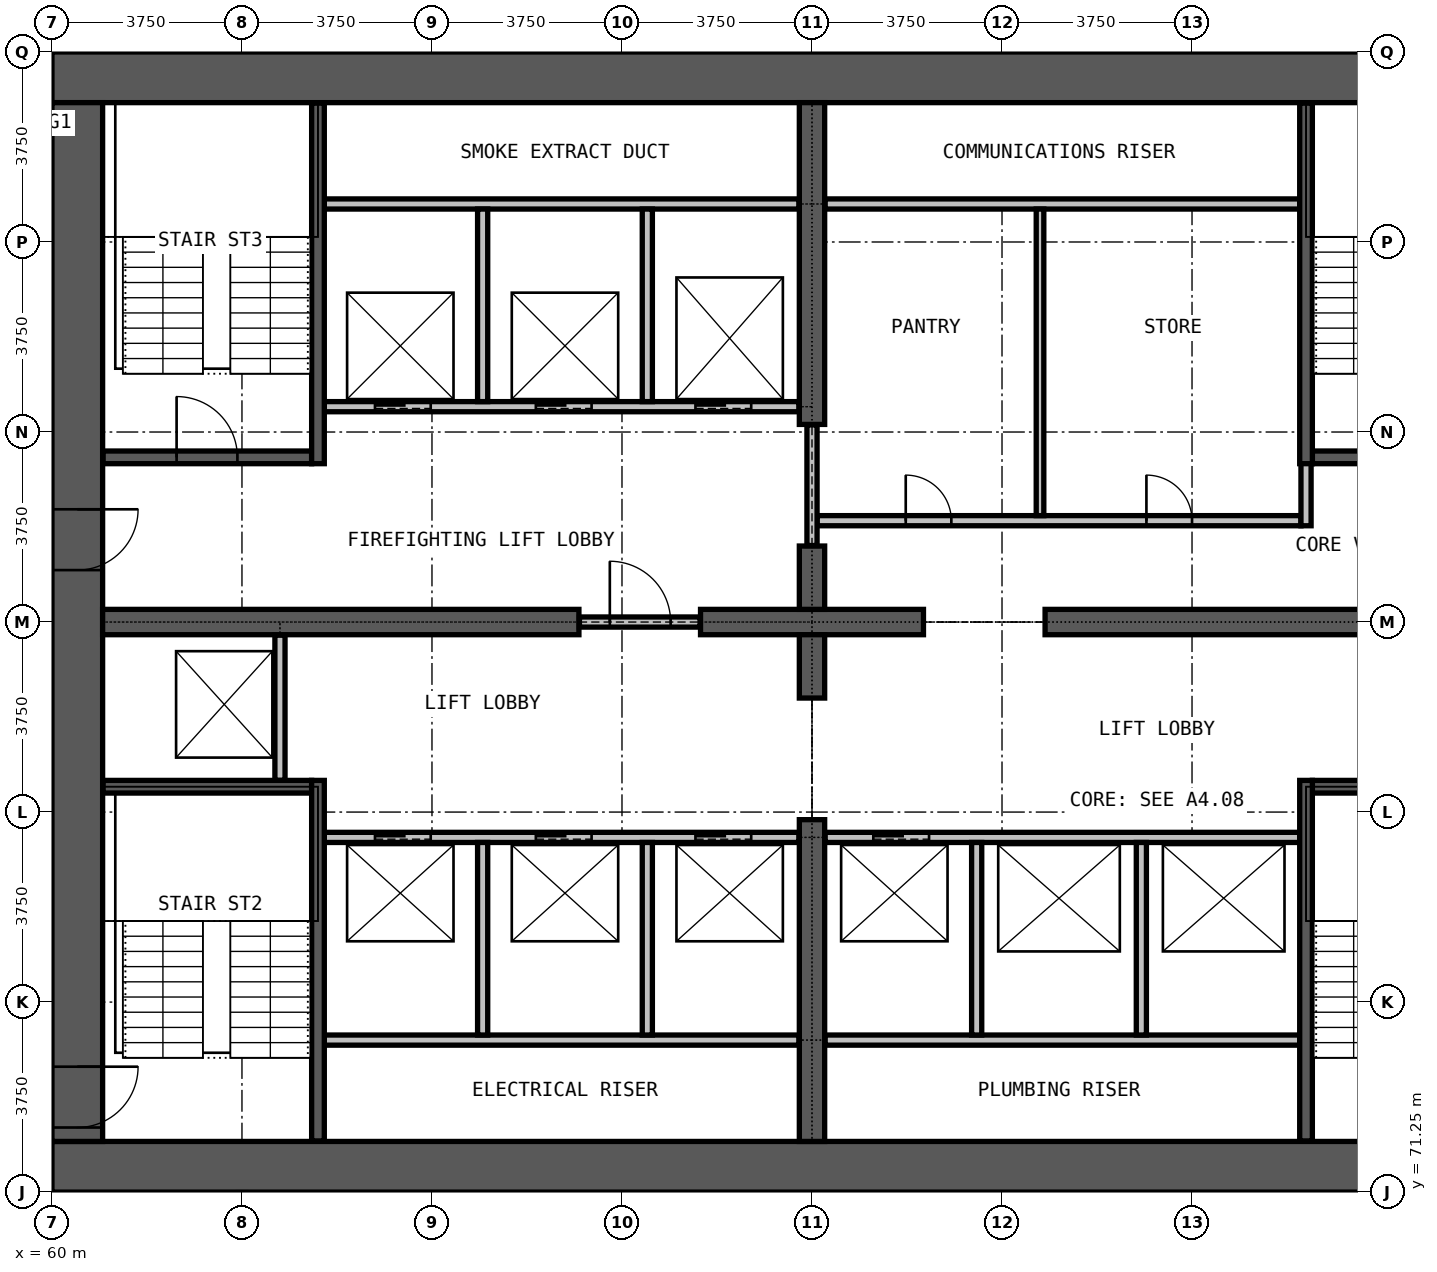
"""IFC4 building model, lengths in metres.
Left out: names, types, materials, properties, quantities, classifications, styles, units other than length and angle.
Written with IfcOpenShell. Run it as: python <this file> out.ifc"""

import sys

from ifc_helpers import new_model, si_unit, direction, frame, frame_2d, origin, place, context, subcontext, project, spatial, rectangle, extrude, element, fill, save


model = new_model("IFC4")
c1 = context("Model", 3, precision=1e-05, world=origin(), true_north=direction((0.0, 1.0)))
c2 = subcontext(c1, "Body", "Model", "MODEL_VIEW")
j1 = project(units=[si_unit("LENGTHUNIT", "METRE"), si_unit("PLANEANGLEUNIT", "RADIAN")], contexts=[c1])
p1 = place(None, origin())
s1 = spatial("IfcSite", under=j1, at=p1, CompositionType="ELEMENT")
p2 = place(p1, origin())
s2 = spatial("IfcBuilding", under=s1, at=p2, CompositionType="ELEMENT")
p3 = place(p2, frame((0.0, 0.0, 65.9)))
s3 = spatial("IfcBuildingStorey", under=s2, at=p3, CompositionType="ELEMENT", Elevation=65.9)
for number, where, z_axis, x_axis in (
    (1, (60.0, 71.75, 0.0), (0.0, 0.0, 1.0), (1.0, 0.0, 0.0)),
    (2, (90.0, 93.25, 0.0), (0.0, 0.0, 1.0), (-1.0, 0.0, 0.0)),
):
    element("IfcWall", number, at=place(p3, frame(where, z_axis=z_axis, x_axis=x_axis)), inside=s3, PredefinedType="SHEAR", context=c2, shape_type="SweptSolid", body=[
        extrude(rectangle(XDim=30.0, YDim=1.0, at=frame_2d((15.0, 0.0))), origin(), (0.0, 0.0, 1.0), 3.3),
    ])
p4 = place(p3, frame((60.5, 92.75, 0.0), z_axis=(0.0, 0.0, 1.0), x_axis=(0.0, -1.0, 0.0)))
e3 = element("IfcWall", 3, at=p4, inside=s3, PredefinedType="SHEAR", context=c2, shape_type="SweptSolid", body=[
    extrude(rectangle(XDim=20.5, YDim=1.0, at=frame_2d((10.25, 0.0))), origin(), (0.0, 0.0, 1.0), 3.3),
])
p5 = place(p4, frame((19.025, 0.0, 0.0)))
e4 = element("IfcOpeningElement", 4, at=p5, cuts=e3, PredefinedType="OPENING", context=c2, shape_type="SweptSolid", body=[
    extrude(rectangle(XDim=1.2, YDim=2.2, at=frame_2d((0.6, 1.1))), frame((0.0, 0.51, 0.0), z_axis=(0.0, -1.0, 0.0), x_axis=(1.0, 0.0, 0.0)), (0.0, 0.0, 1.0), 1.02),
])
p6 = place(p4, frame((8.025, 0.0, 0.0)))
e5 = element("IfcOpeningElement", 5, at=p6, cuts=e3, PredefinedType="OPENING", context=c2, shape_type="SweptSolid", body=[
    extrude(rectangle(XDim=1.2, YDim=2.2, at=frame_2d((0.6, 1.1))), frame((0.0, 0.51, 0.0), z_axis=(0.0, -1.0, 0.0), x_axis=(1.0, 0.0, 0.0)), (0.0, 0.0, 1.0), 1.02),
])
p7 = place(p3, frame((61.0, 82.5, 0.0), z_axis=(0.0, 0.0, 1.0), x_axis=(1.0, 0.0, 0.0)))
e6 = element("IfcWall", 6, at=p7, inside=s3, PredefinedType="SHEAR", context=c2, shape_type="SweptSolid", body=[
    extrude(rectangle(XDim=9.4, YDim=0.5, at=frame_2d((4.7, 0.0))), origin(), (0.0, 0.0, 1.0), 3.3),
])
p8 = place(p3, frame((72.8, 82.5, 0.0), z_axis=(0.0, 0.0, 1.0), x_axis=(1.0, 0.0, 0.0)))
e7 = element("IfcWall", 7, at=p8, inside=s3, PredefinedType="SHEAR", context=c2, shape_type="SweptSolid", body=[
    extrude(rectangle(XDim=4.4, YDim=0.5, at=frame_2d((2.2, 0.0))), origin(), (0.0, 0.0, 1.0), 3.3),
])
p9 = place(p3, frame((79.6, 82.5, 0.0), z_axis=(0.0, 0.0, 1.0), x_axis=(1.0, 0.0, 0.0)))
e8 = element("IfcWall", 8, at=p9, inside=s3, PredefinedType="SHEAR", context=c2, shape_type="SweptSolid", body=[
    extrude(rectangle(XDim=9.4, YDim=0.5, at=frame_2d((4.7, 0.0))), origin(), (0.0, 0.0, 1.0), 3.3),
])
p10 = place(p3, frame((75.0, 72.25, 0.0), z_axis=(0.0, 0.0, 1.0), x_axis=(0.0, 1.0, 0.0)))
e9 = element("IfcWall", 9, at=p10, inside=s3, PredefinedType="SHEAR", context=c2, shape_type="SweptSolid", body=[
    extrude(rectangle(XDim=6.35, YDim=0.5, at=frame_2d((3.175, 0.0))), origin(), (0.0, 0.0, 1.0), 3.3),
])
for number, where, z_axis, x_axis in (
    (10, (75.0, 81.0, 0.0), (0.0, 0.0, 1.0), (0.0, 1.0, 0.0)),
    (11, (75.0, 82.75, 0.0), (0.0, 0.0, 1.0), (0.0, 1.0, 0.0)),
):
    element("IfcWall", number, at=place(p3, frame(where, z_axis=z_axis, x_axis=x_axis)), inside=s3, PredefinedType="SHEAR", context=c2, shape_type="SweptSolid", body=[
        extrude(rectangle(XDim=1.25, YDim=0.5, at=frame_2d((0.625, 0.0))), origin(), (0.0, 0.0, 1.0), 3.3),
    ])
p11 = place(p3, frame((75.0, 86.4, 0.0), z_axis=(0.0, 0.0, 1.0), x_axis=(0.0, 1.0, 0.0)))
e12 = element("IfcWall", 12, at=p11, inside=s3, PredefinedType="SHEAR", context=c2, shape_type="SweptSolid", body=[
    extrude(rectangle(XDim=6.35, YDim=0.5, at=frame_2d((3.175, 0.0))), origin(), (0.0, 0.0, 1.0), 3.3),
])
p12 = place(p3, frame((70.41, 82.5, 0.0), z_axis=(0.0, 0.0, 1.0), x_axis=(1.0, 0.0, 0.0)))
e13 = element("IfcWall", 13, at=p12, inside=s3, PredefinedType="PARTITIONING", context=c2, shape_type="SweptSolid", body=[
    extrude(rectangle(XDim=2.38, YDim=0.2, at=frame_2d((1.19, 0.0))), origin(), (0.0, 0.0, 1.0), 2.4),
])
p13 = place(p12, frame((0.6, 0.0, 0.0)))
e14 = element("IfcOpeningElement", 14, at=p13, cuts=e13, PredefinedType="OPENING", context=c2, shape_type="SweptSolid", body=[
    extrude(rectangle(XDim=1.2, YDim=2.2, at=frame_2d((0.6, 1.1))), frame((0.0, 0.11, 0.0), z_axis=(0.0, -1.0, 0.0), x_axis=(1.0, 0.0, 0.0)), (0.0, 0.0, 1.0), 0.22),
])
p14 = place(p3, frame((75.1, 84.5, 0.0), z_axis=(0.0, 0.0, 1.0), x_axis=(1.0, 0.0, 0.0)))
e15 = element("IfcWall", 15, at=p14, inside=s3, PredefinedType="PARTITIONING", context=c2, shape_type="SweptSolid", body=[
    extrude(rectangle(XDim=9.55, YDim=0.2, at=frame_2d((4.775, 0.0))), origin(), (0.0, 0.0, 1.0), 3.0),
])
p15 = place(p14, frame((1.75, 0.0, 0.0)))
e16 = element("IfcOpeningElement", 16, at=p15, cuts=e15, PredefinedType="OPENING", context=c2, shape_type="SweptSolid", body=[
    extrude(rectangle(XDim=0.9, YDim=2.2, at=frame_2d((0.45, 1.1))), frame((0.0, 0.11, 0.0), z_axis=(0.0, -1.0, 0.0), x_axis=(1.0, 0.0, 0.0)), (0.0, 0.0, 1.0), 0.22),
])
p16 = place(p14, frame((6.5, 0.0, 0.0)))
e17 = element("IfcOpeningElement", 17, at=p16, cuts=e15, PredefinedType="OPENING", context=c2, shape_type="SweptSolid", body=[
    extrude(rectangle(XDim=0.9, YDim=2.2, at=frame_2d((0.45, 1.1))), frame((0.0, 0.11, 0.0), z_axis=(0.0, -1.0, 0.0), x_axis=(1.0, 0.0, 0.0)), (0.0, 0.0, 1.0), 0.22),
])
p17 = place(p3, frame((75.26, 90.75, 0.0), z_axis=(0.0, 0.0, 1.0), x_axis=(1.0, 0.0, 0.0)))
e18 = element("IfcWall", 18, at=p17, inside=s3, PredefinedType="PARTITIONING", context=c2, shape_type="SweptSolid", body=[
    extrude(rectangle(XDim=9.365, YDim=0.2, at=frame_2d((4.683, 0.0))), origin(), (0.0, 0.0, 1.0), 3.0),
])
p18 = place(p3, frame((75.0, 84.01, 0.0), z_axis=(0.0, 0.0, 1.0), x_axis=(0.0, 1.0, 0.0)))
e19 = element("IfcWall", 19, at=p18, inside=s3, PredefinedType="PARTITIONING", context=c2, shape_type="SweptSolid", body=[
    extrude(rectangle(XDim=2.38, YDim=0.2, at=frame_2d((1.19, 0.0))), origin(), (0.0, 0.0, 1.0), 2.4),
])
p19 = place(p3, frame((84.75, 84.4, 0.0), z_axis=(0.0, 0.0, 1.0), x_axis=(0.0, 1.0, 0.0)))
e20 = element("IfcWall", 20, at=p19, inside=s3, PredefinedType="PARTITIONING", context=c2, shape_type="SweptSolid", body=[
    extrude(rectangle(XDim=1.475, YDim=0.2, at=frame_2d((0.738, 0.0))), origin(), (0.0, 0.0, 1.0), 3.0),
])
p20 = place(p3, frame((79.5, 84.6, 0.0), z_axis=(0.0, 0.0, 1.0), x_axis=(0.0, 1.0, 0.0)))
e21 = element("IfcWall", 21, at=p20, inside=s3, PredefinedType="PARTITIONING", context=c2, shape_type="SweptSolid", body=[
    extrude(rectangle(XDim=6.05, YDim=0.15, at=frame_2d((3.025, 0.0))), origin(), (0.0, 0.0, 1.0), 3.0),
])
for number, where, z_axis, x_axis in (
    (22, (65.375, 74.25, 0.0), (0.0, 0.0, 1.0), (1.0, 0.0, 0.0)),
    (23, (75.26, 74.25, 0.0), (0.0, 0.0, 1.0), (1.0, 0.0, 0.0)),
):
    element("IfcWall", number, at=place(p3, frame(where, z_axis=z_axis, x_axis=x_axis)), inside=s3, PredefinedType="PARTITIONING", context=c2, shape_type="SweptSolid", body=[
        extrude(rectangle(XDim=9.365, YDim=0.2, at=frame_2d((4.683, 0.0))), origin(), (0.0, 0.0, 1.0), 3.0),
    ])
p21 = place(p3, frame((65.375, 78.25, 0.0), z_axis=(0.0, 0.0, 1.0), x_axis=(1.0, 0.0, 0.0)))
e24 = element("IfcWall", 24, at=p21, inside=s3, PredefinedType="PARTITIONING", context=c2, shape_type="SweptSolid", body=[
    extrude(rectangle(XDim=9.365, YDim=0.2, at=frame_2d((4.683, 0.0))), origin(), (0.0, 0.0, 1.0), 3.0),
])
p22 = place(p21, frame((1.0, 0.0, 0.0)))
e25 = element("IfcOpeningElement", 25, at=p22, cuts=e24, PredefinedType="OPENING", context=c2, shape_type="SweptSolid", body=[
    extrude(rectangle(XDim=1.1, YDim=2.2, at=frame_2d((0.55, 1.1))), frame((0.0, 0.11, 0.0), z_axis=(0.0, -1.0, 0.0), x_axis=(1.0, 0.0, 0.0)), (0.0, 0.0, 1.0), 0.22),
])
p23 = place(p21, frame((4.175, 0.0, 0.0)))
e26 = element("IfcOpeningElement", 26, at=p23, cuts=e24, PredefinedType="OPENING", context=c2, shape_type="SweptSolid", body=[
    extrude(rectangle(XDim=1.1, YDim=2.2, at=frame_2d((0.55, 1.1))), frame((0.0, 0.11, 0.0), z_axis=(0.0, -1.0, 0.0), x_axis=(1.0, 0.0, 0.0)), (0.0, 0.0, 1.0), 0.22),
])
p24 = place(p21, frame((7.325, 0.0, 0.0)))
e27 = element("IfcOpeningElement", 27, at=p24, cuts=e24, PredefinedType="OPENING", context=c2, shape_type="SweptSolid", body=[
    extrude(rectangle(XDim=1.1, YDim=2.2, at=frame_2d((0.55, 1.1))), frame((0.0, 0.11, 0.0), z_axis=(0.0, -1.0, 0.0), x_axis=(1.0, 0.0, 0.0)), (0.0, 0.0, 1.0), 0.22),
])
p25 = place(p3, frame((75.26, 78.25, 0.0), z_axis=(0.0, 0.0, 1.0), x_axis=(1.0, 0.0, 0.0)))
e28 = element("IfcWall", 28, at=p25, inside=s3, PredefinedType="PARTITIONING", context=c2, shape_type="SweptSolid", body=[
    extrude(rectangle(XDim=9.365, YDim=0.2, at=frame_2d((4.683, 0.0))), origin(), (0.0, 0.0, 1.0), 3.0),
])
p26 = place(p25, frame((0.95, 0.0, 0.0)))
e29 = element("IfcOpeningElement", 29, at=p26, cuts=e28, PredefinedType="OPENING", context=c2, shape_type="SweptSolid", body=[
    extrude(rectangle(XDim=1.1, YDim=2.2, at=frame_2d((0.55, 1.1))), frame((0.0, 0.11, 0.0), z_axis=(0.0, -1.0, 0.0), x_axis=(1.0, 0.0, 0.0)), (0.0, 0.0, 1.0), 0.22),
])
p27 = place(p3, frame((65.375, 86.75, 0.0), z_axis=(0.0, 0.0, 1.0), x_axis=(1.0, 0.0, 0.0)))
e30 = element("IfcWall", 30, at=p27, inside=s3, PredefinedType="PARTITIONING", context=c2, shape_type="SweptSolid", body=[
    extrude(rectangle(XDim=9.365, YDim=0.2, at=frame_2d((4.683, 0.0))), origin(), (0.0, 0.0, 1.0), 3.0),
])
p28 = place(p27, frame((1.0, 0.0, 0.0)))
e31 = element("IfcOpeningElement", 31, at=p28, cuts=e30, PredefinedType="OPENING", context=c2, shape_type="SweptSolid", body=[
    extrude(rectangle(XDim=1.1, YDim=2.2, at=frame_2d((0.55, 1.1))), frame((0.0, 0.11, 0.0), z_axis=(0.0, -1.0, 0.0), x_axis=(1.0, 0.0, 0.0)), (0.0, 0.0, 1.0), 0.22),
])
p29 = place(p27, frame((4.175, 0.0, 0.0)))
e32 = element("IfcOpeningElement", 32, at=p29, cuts=e30, PredefinedType="OPENING", context=c2, shape_type="SweptSolid", body=[
    extrude(rectangle(XDim=1.1, YDim=2.2, at=frame_2d((0.55, 1.1))), frame((0.0, 0.11, 0.0), z_axis=(0.0, -1.0, 0.0), x_axis=(1.0, 0.0, 0.0)), (0.0, 0.0, 1.0), 0.22),
])
p30 = place(p27, frame((7.325, 0.0, 0.0)))
e33 = element("IfcOpeningElement", 33, at=p30, cuts=e30, PredefinedType="OPENING", context=c2, shape_type="SweptSolid", body=[
    extrude(rectangle(XDim=1.1, YDim=2.2, at=frame_2d((0.55, 1.1))), frame((0.0, 0.11, 0.0), z_axis=(0.0, -1.0, 0.0), x_axis=(1.0, 0.0, 0.0)), (0.0, 0.0, 1.0), 0.22),
])
p31 = place(p3, frame((65.375, 90.75, 0.0), z_axis=(0.0, 0.0, 1.0), x_axis=(1.0, 0.0, 0.0)))
e34 = element("IfcWall", 34, at=p31, inside=s3, PredefinedType="PARTITIONING", context=c2, shape_type="SweptSolid", body=[
    extrude(rectangle(XDim=9.365, YDim=0.2, at=frame_2d((4.683, 0.0))), origin(), (0.0, 0.0, 1.0), 3.0),
])
p32 = place(p3, frame((64.5, 79.375, 0.0), z_axis=(0.0, 0.0, 1.0), x_axis=(0.0, 1.0, 0.0)))
e35 = element("IfcWall", 35, at=p32, inside=s3, PredefinedType="PARTITIONING", context=c2, shape_type="SweptSolid", body=[
    extrude(rectangle(XDim=2.865, YDim=0.2, at=frame_2d((1.433, 0.0))), origin(), (0.0, 0.0, 1.0), 3.0),
])
for number, where, z_axis, x_axis in (
    (36, (68.5, 74.35, 0.0), (0.0, 0.0, 1.0), (0.0, 1.0, 0.0)),
    (37, (68.5, 86.85, 0.0), (0.0, 0.0, 1.0), (0.0, 1.0, 0.0)),
    (38, (71.75, 74.35, 0.0), (0.0, 0.0, 1.0), (0.0, 1.0, 0.0)),
    (39, (71.75, 86.85, 0.0), (0.0, 0.0, 1.0), (0.0, 1.0, 0.0)),
    (40, (78.25, 74.35, 0.0), (0.0, 0.0, 1.0), (0.0, 1.0, 0.0)),
    (41, (81.5, 74.35, 0.0), (0.0, 0.0, 1.0), (0.0, 1.0, 0.0)),
):
    element("IfcWall", number, at=place(p3, frame(where, z_axis=z_axis, x_axis=x_axis)), inside=s3, PredefinedType="PARTITIONING", context=c2, shape_type="SweptSolid", body=[
        extrude(rectangle(XDim=3.8, YDim=0.2, at=frame_2d((1.9, 0.0))), origin(), (0.0, 0.0, 1.0), 3.0),
    ])
for number, where, z_axis, x_axis in (
    (42, (61.01, 79.25, 0.0), (0.0, 0.0, 1.0), (1.0, 0.0, 0.0)),
    (43, (84.875, 79.25, 0.0), (0.0, 0.0, 1.0), (1.0, 0.0, 0.0)),
):
    element("IfcWall", number, at=place(p3, frame(where, z_axis=z_axis, x_axis=x_axis)), inside=s3, PredefinedType="PARTITIONING", context=c2, shape_type="SweptSolid", body=[
        extrude(rectangle(XDim=4.115, YDim=0.25, at=frame_2d((2.058, 0.0))), origin(), (0.0, 0.0, 1.0), 3.0),
    ])
p33 = place(p3, frame((61.01, 85.75, 0.0), z_axis=(0.0, 0.0, 1.0), x_axis=(1.0, 0.0, 0.0)))
e44 = element("IfcWall", 44, at=p33, inside=s3, PredefinedType="PARTITIONING", context=c2, shape_type="SweptSolid", body=[
    extrude(rectangle(XDim=4.115, YDim=0.25, at=frame_2d((2.058, 0.0))), origin(), (0.0, 0.0, 1.0), 3.0),
])
p34 = place(p33, frame((1.45, 0.0, 0.0)))
e45 = element("IfcOpeningElement", 45, at=p34, cuts=e44, PredefinedType="OPENING", context=c2, shape_type="SweptSolid", body=[
    extrude(rectangle(XDim=1.2, YDim=2.2, at=frame_2d((0.6, 1.1))), frame((0.0, 0.135, 0.0), z_axis=(0.0, -1.0, 0.0), x_axis=(1.0, 0.0, 0.0)), (0.0, 0.0, 1.0), 0.27),
])
p35 = place(p3, frame((84.875, 85.75, 0.0), z_axis=(0.0, 0.0, 1.0), x_axis=(1.0, 0.0, 0.0)))
e46 = element("IfcWall", 46, at=p35, inside=s3, PredefinedType="PARTITIONING", context=c2, shape_type="SweptSolid", body=[
    extrude(rectangle(XDim=4.115, YDim=0.25, at=frame_2d((2.058, 0.0))), origin(), (0.0, 0.0, 1.0), 3.0),
])
for number, where, z_axis, x_axis in (
    (47, (65.25, 72.26, 0.0), (0.0, 0.0, 1.0), (0.0, 1.0, 0.0)),
    (48, (65.25, 85.625, 0.0), (0.0, 0.0, 1.0), (0.0, 1.0, 0.0)),
    (49, (84.75, 72.26, 0.0), (0.0, 0.0, 1.0), (0.0, 1.0, 0.0)),
    (50, (84.75, 85.625, 0.0), (0.0, 0.0, 1.0), (0.0, 1.0, 0.0)),
):
    element("IfcWall", number, at=place(p3, frame(where, z_axis=z_axis, x_axis=x_axis)), inside=s3, PredefinedType="PARTITIONING", context=c2, shape_type="SweptSolid", body=[
        extrude(rectangle(XDim=7.115, YDim=0.25, at=frame_2d((3.558, 0.0))), origin(), (0.0, 0.0, 1.0), 3.0),
    ])
p36 = place(p22, origin())
e51 = element("IfcDoor", 51, at=p36, inside=s3, OperationType="DOUBLE_DOOR_SLIDING", PredefinedType="DOOR", context=c2, shape_type="SweptSolid", body=[
    extrude(rectangle(XDim=1.1, YDim=2.2, at=frame_2d((0.55, 1.1))), frame((0.0, 0.025, 0.0), z_axis=(0.0, -1.0, 0.0), x_axis=(1.0, 0.0, 0.0)), (0.0, 0.0, 1.0), 0.05),
])
fill(e25, e51)
p37 = place(p23, origin())
e52 = element("IfcDoor", 52, at=p37, inside=s3, OperationType="DOUBLE_DOOR_SLIDING", PredefinedType="DOOR", context=c2, shape_type="SweptSolid", body=[
    extrude(rectangle(XDim=1.1, YDim=2.2, at=frame_2d((0.55, 1.1))), frame((0.0, 0.025, 0.0), z_axis=(0.0, -1.0, 0.0), x_axis=(1.0, 0.0, 0.0)), (0.0, 0.0, 1.0), 0.05),
])
fill(e26, e52)
p38 = place(p24, origin())
e53 = element("IfcDoor", 53, at=p38, inside=s3, OperationType="DOUBLE_DOOR_SLIDING", PredefinedType="DOOR", context=c2, shape_type="SweptSolid", body=[
    extrude(rectangle(XDim=1.1, YDim=2.2, at=frame_2d((0.55, 1.1))), frame((0.0, 0.025, 0.0), z_axis=(0.0, -1.0, 0.0), x_axis=(1.0, 0.0, 0.0)), (0.0, 0.0, 1.0), 0.05),
])
fill(e27, e53)
p39 = place(p26, origin())
e54 = element("IfcDoor", 54, at=p39, inside=s3, OperationType="DOUBLE_DOOR_SLIDING", PredefinedType="DOOR", context=c2, shape_type="SweptSolid", body=[
    extrude(rectangle(XDim=1.1, YDim=2.2, at=frame_2d((0.55, 1.1))), frame((0.0, 0.025, 0.0), z_axis=(0.0, -1.0, 0.0), x_axis=(1.0, 0.0, 0.0)), (0.0, 0.0, 1.0), 0.05),
])
fill(e29, e54)
p40 = place(p28, origin())
e55 = element("IfcDoor", 55, at=p40, inside=s3, OperationType="DOUBLE_DOOR_SLIDING", PredefinedType="DOOR", context=c2, shape_type="SweptSolid", body=[
    extrude(rectangle(XDim=1.1, YDim=2.2, at=frame_2d((0.55, 1.1))), frame((0.0, 0.025, 0.0), z_axis=(0.0, -1.0, 0.0), x_axis=(1.0, 0.0, 0.0)), (0.0, 0.0, 1.0), 0.05),
])
fill(e31, e55)
p41 = place(p29, origin())
e56 = element("IfcDoor", 56, at=p41, inside=s3, OperationType="DOUBLE_DOOR_SLIDING", PredefinedType="DOOR", context=c2, shape_type="SweptSolid", body=[
    extrude(rectangle(XDim=1.1, YDim=2.2, at=frame_2d((0.55, 1.1))), frame((0.0, 0.025, 0.0), z_axis=(0.0, -1.0, 0.0), x_axis=(1.0, 0.0, 0.0)), (0.0, 0.0, 1.0), 0.05),
])
fill(e32, e56)
p42 = place(p30, origin())
e57 = element("IfcDoor", 57, at=p42, inside=s3, OperationType="DOUBLE_DOOR_SLIDING", PredefinedType="DOOR", context=c2, shape_type="SweptSolid", body=[
    extrude(rectangle(XDim=1.1, YDim=2.2, at=frame_2d((0.55, 1.1))), frame((0.0, 0.025, 0.0), z_axis=(0.0, -1.0, 0.0), x_axis=(1.0, 0.0, 0.0)), (0.0, 0.0, 1.0), 0.05),
])
fill(e33, e57)
p43 = place(p13, origin())
e58 = element("IfcDoor", 58, at=p43, inside=s3, OperationType="SINGLE_SWING_LEFT", PredefinedType="DOOR", context=c2, shape_type="SweptSolid", body=[
    extrude(rectangle(XDim=1.2, YDim=2.2, at=frame_2d((0.6, 1.1))), frame((0.0, 0.025, 0.0), z_axis=(0.0, -1.0, 0.0), x_axis=(1.0, 0.0, 0.0)), (0.0, 0.0, 1.0), 0.05),
])
fill(e14, e58)
p44 = place(p34, origin())
e59 = element("IfcDoor", 59, at=p44, inside=s3, OperationType="SINGLE_SWING_LEFT", PredefinedType="DOOR", context=c2, shape_type="SweptSolid", body=[
    extrude(rectangle(XDim=1.2, YDim=2.2, at=frame_2d((0.6, 1.1))), frame((0.0, 0.025, 0.0), z_axis=(0.0, -1.0, 0.0), x_axis=(1.0, 0.0, 0.0)), (0.0, 0.0, 1.0), 0.05),
])
fill(e45, e59)
p45 = place(p5, origin())
e60 = element("IfcDoor", 60, at=p45, inside=s3, OperationType="SINGLE_SWING_LEFT", PredefinedType="DOOR", context=c2, shape_type="SweptSolid", body=[
    extrude(rectangle(XDim=1.2, YDim=2.2, at=frame_2d((0.6, 1.1))), frame((0.0, 0.025, 0.0), z_axis=(0.0, -1.0, 0.0), x_axis=(1.0, 0.0, 0.0)), (0.0, 0.0, 1.0), 0.05),
])
fill(e4, e60)
p46 = place(p6, origin())
e61 = element("IfcDoor", 61, at=p46, inside=s3, OperationType="SINGLE_SWING_LEFT", PredefinedType="DOOR", context=c2, shape_type="SweptSolid", body=[
    extrude(rectangle(XDim=1.2, YDim=2.2, at=frame_2d((0.6, 1.1))), frame((0.0, 0.025, 0.0), z_axis=(0.0, -1.0, 0.0), x_axis=(1.0, 0.0, 0.0)), (0.0, 0.0, 1.0), 0.05),
])
fill(e5, e61)
p47 = place(p15, origin())
e62 = element("IfcDoor", 62, at=p47, inside=s3, OperationType="SINGLE_SWING_LEFT", PredefinedType="DOOR", context=c2, shape_type="SweptSolid", body=[
    extrude(rectangle(XDim=0.9, YDim=2.2, at=frame_2d((0.45, 1.1))), frame((0.0, 0.025, 0.0), z_axis=(0.0, -1.0, 0.0), x_axis=(1.0, 0.0, 0.0)), (0.0, 0.0, 1.0), 0.05),
])
fill(e16, e62)
p48 = place(p16, origin())
e63 = element("IfcDoor", 63, at=p48, inside=s3, OperationType="SINGLE_SWING_LEFT", PredefinedType="DOOR", context=c2, shape_type="SweptSolid", body=[
    extrude(rectangle(XDim=0.9, YDim=2.2, at=frame_2d((0.45, 1.1))), frame((0.0, 0.025, 0.0), z_axis=(0.0, -1.0, 0.0), x_axis=(1.0, 0.0, 0.0)), (0.0, 0.0, 1.0), 0.05),
])
fill(e17, e63)
save(model, sys.argv[1])
